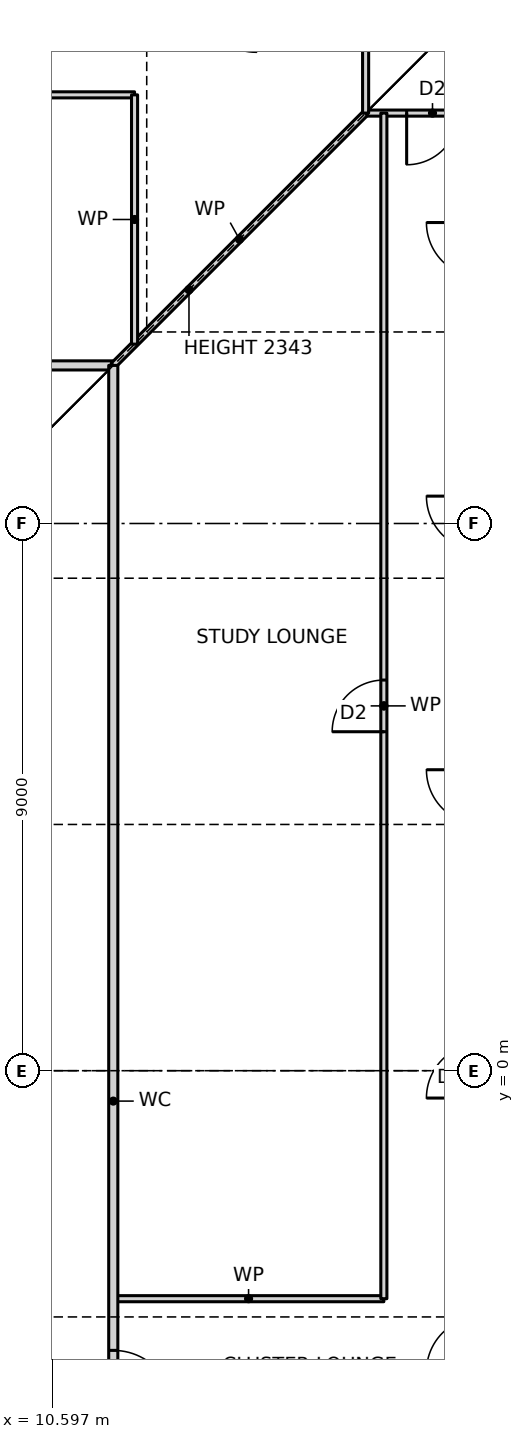
"""IFC4 building model, lengths in metres.
Left out: names, types, materials, properties, quantities, classifications, styles, units other than length and angle.
Written with IfcOpenShell. Run it as: python <this file> out.ifc"""

import sys

from ifc_helpers import new_model, si_unit, direction, frame, frame_2d, origin, place, context, subcontext, project, spatial, rectangle, extrude, element, fill, save


model = new_model("IFC4")
c1 = context("Model", 3, precision=1e-05, world=origin(), true_north=direction((0.0, 1.0)))
c2 = subcontext(c1, "Body", "Model", "MODEL_VIEW")
j1 = project(units=[si_unit("LENGTHUNIT", "METRE"), si_unit("PLANEANGLEUNIT", "RADIAN")], contexts=[c1])
p1 = place(None, origin())
s1 = spatial("IfcSite", under=j1, at=p1, CompositionType="ELEMENT")
p2 = place(p1, origin())
s2 = spatial("IfcBuilding", under=s1, at=p2, CompositionType="ELEMENT")
p3 = place(p2, frame((0.0, 0.0, 22.0)))
s3 = spatial("IfcBuildingStorey", under=s2, at=p3, CompositionType="ELEMENT", Elevation=22.0)
p4 = place(p3, frame((11.6, -3.75, 0.0), z_axis=(0.0, 0.0, 1.0), x_axis=(1.0, 0.0, 0.0)))
e1 = element("IfcWall", 1, at=p4, inside=s3, PredefinedType="PARTITIONING", context=c2, shape_type="SweptSolid", body=[
    extrude(rectangle(XDim=4.45, YDim=0.1, at=frame_2d((2.225, 0.0))), origin(), (0.0, 0.0, 1.0), 3.27),
])
p5 = place(p3, frame((-11.6, 11.6, 0.0), z_axis=(0.0, 0.0, 1.0), x_axis=(1.0, 0.0, 0.0)))
e2 = element("IfcWall", 2, at=p5, inside=s3, PredefinedType="PARTITIONING", context=c2, shape_type="SweptSolid", body=[
    extrude(rectangle(XDim=23.2, YDim=0.15, at=frame_2d((11.6, 0.0))), origin(), (0.0, 0.0, 1.0), 3.27),
])
p6 = place(p5, frame((1.65, 0.0, 0.0)))
e3 = element("IfcOpeningElement", 3, at=p6, cuts=e2, PredefinedType="OPENING", context=c2, shape_type="SweptSolid", body=[
    extrude(rectangle(XDim=1.0, YDim=2.1, at=frame_2d((0.5, 1.05))), frame((0.0, 0.085, 0.0), z_axis=(0.0, -1.0, 0.0), x_axis=(1.0, 0.0, 0.0)), (0.0, 0.0, 1.0), 0.17),
])
p7 = place(p3, frame((15.75, 15.75, 0.0), z_axis=(0.0, 0.0, 1.0), x_axis=(1.0, 0.0, 0.0)))
e4 = element("IfcWall", 4, at=p7, inside=s3, PredefinedType="PARTITIONING", context=c2, shape_type="SweptSolid", body=[
    extrude(rectangle(XDim=7.44, YDim=0.1, at=frame_2d((3.72, 0.0))), origin(), (0.0, 0.0, 1.0), 3.27),
])
p8 = place(p7, frame((0.675, 0.0, 0.0)))
e5 = element("IfcOpeningElement", 5, at=p8, cuts=e4, PredefinedType="OPENING", context=c2, shape_type="SweptSolid", body=[
    extrude(rectangle(XDim=0.85, YDim=2.1, at=frame_2d((0.425, 1.05))), frame((0.0, 0.06, 0.0), z_axis=(0.0, -1.0, 0.0), x_axis=(1.0, 0.0, 0.0)), (0.0, 0.0, 1.0), 0.12),
])
p9 = place(p3, frame((-8.25, 16.05, 0.0), z_axis=(0.0, 0.0, 1.0), x_axis=(1.0, 0.0, 0.0)))
e6 = element("IfcWall", 6, at=p9, inside=s3, PredefinedType="PARTITIONING", context=c2, shape_type="SweptSolid", body=[
    extrude(rectangle(XDim=20.2, YDim=0.1, at=frame_2d((10.1, 0.0))), origin(), (0.0, 0.0, 1.0), 3.27),
])
p10 = place(p9, frame((9.675, 0.0, 0.0)))
e7 = element("IfcOpeningElement", 7, at=p10, cuts=e6, PredefinedType="OPENING", context=c2, shape_type="SweptSolid", body=[
    extrude(rectangle(XDim=0.85, YDim=2.1, at=frame_2d((0.425, 1.05))), frame((0.0, 0.06, 0.0), z_axis=(0.0, -1.0, 0.0), x_axis=(1.0, 0.0, 0.0)), (0.0, 0.0, 1.0), 0.12),
])
p11 = place(p3, frame((11.6, 11.6, 0.0), z_axis=(0.0, 0.0, 1.0), x_axis=(0.707106781187, 0.707106781187, 0.0)))
e8 = element("IfcWall", 8, at=p11, inside=s3, PredefinedType="PARTITIONING", context=c2, shape_type="SweptSolid", body=[
    extrude(rectangle(XDim=5.869, YDim=0.1, at=frame_2d((2.935, 0.0))), origin(), (0.0, 0.0, 1.0), 2.343),
])
p12 = place(p3, frame((16.05, -3.75, 0.0), z_axis=(0.0, 0.0, 1.0), x_axis=(0.0, 1.0, 0.0)))
e9 = element("IfcWall", 9, at=p12, inside=s3, PredefinedType="PARTITIONING", context=c2, shape_type="SweptSolid", body=[
    extrude(rectangle(XDim=19.5, YDim=0.1, at=frame_2d((9.75, 0.0))), origin(), (0.0, 0.0, 1.0), 3.27),
])
p13 = place(p12, frame((9.325, 0.0, 0.0)))
e10 = element("IfcOpeningElement", 10, at=p13, cuts=e9, PredefinedType="OPENING", context=c2, shape_type="SweptSolid", body=[
    extrude(rectangle(XDim=0.85, YDim=2.1, at=frame_2d((0.425, 1.05))), frame((0.0, 0.06, 0.0), z_axis=(0.0, -1.0, 0.0), x_axis=(1.0, 0.0, 0.0)), (0.0, 0.0, 1.0), 0.12),
])
p14 = place(p3, frame((15.75, 15.75, 0.0), z_axis=(0.0, 0.0, 1.0), x_axis=(0.0, 1.0, 0.0)))
e11 = element("IfcWall", 11, at=p14, inside=s3, PredefinedType="PARTITIONING", context=c2, shape_type="SweptSolid", body=[
    extrude(rectangle(XDim=7.44, YDim=0.1, at=frame_2d((3.72, 0.0))), origin(), (0.0, 0.0, 1.0), 3.27),
])
p15 = place(p3, frame((11.95, 11.95, 0.0), z_axis=(0.0, 0.0, 1.0), x_axis=(0.0, 1.0, 0.0)))
e12 = element("IfcWall", 12, at=p15, inside=s3, PredefinedType="PARTITIONING", context=c2, shape_type="SweptSolid", body=[
    extrude(rectangle(XDim=4.1, YDim=0.1, at=frame_2d((2.05, 0.0))), origin(), (0.0, 0.0, 1.0), 3.27),
])
p16 = place(p3, frame((11.6, -12.6, 0.0), z_axis=(0.0, 0.0, 1.0), x_axis=(0.0, 1.0, 0.0)))
e13 = element("IfcWall", 13, at=p16, inside=s3, PredefinedType="PARTITIONING", context=c2, shape_type="SweptSolid", body=[
    extrude(rectangle(XDim=24.2, YDim=0.15, at=frame_2d((12.1, 0.0))), origin(), (0.0, 0.0, 1.0), 3.27),
])
p17 = place(p16, frame((7.0, 0.0, 0.0)))
e14 = element("IfcOpeningElement", 14, at=p17, cuts=e13, PredefinedType="OPENING", context=c2, shape_type="SweptSolid", body=[
    extrude(rectangle(XDim=1.0, YDim=2.1, at=frame_2d((0.5, 1.05))), frame((0.0, 0.085, 0.0), z_axis=(0.0, -1.0, 0.0), x_axis=(1.0, 0.0, 0.0)), (0.0, 0.0, 1.0), 0.17),
])
p18 = place(p16, frame((4.8, 0.0, 0.0)))
e15 = element("IfcOpeningElement", 15, at=p18, cuts=e13, PredefinedType="OPENING", context=c2, shape_type="SweptSolid", body=[
    extrude(rectangle(XDim=0.9, YDim=2.1, at=frame_2d((0.45, 1.05))), frame((0.0, 0.085, 0.0), z_axis=(0.0, -1.0, 0.0), x_axis=(1.0, 0.0, 0.0)), (0.0, 0.0, 1.0), 0.17),
])
p19 = place(p17, frame((1.0, 0.0, 0.0), z_axis=(0.0, 0.0, 1.0), x_axis=(-1.0, 0.0, 0.0)))
e16 = element("IfcDoor", 16, at=p19, inside=s3, OperationType="SINGLE_SWING_RIGHT", PredefinedType="DOOR", context=c2, shape_type="SweptSolid", body=[
    extrude(rectangle(XDim=1.0, YDim=2.1, at=frame_2d((0.5, 1.05))), frame((0.0, 0.025, 0.0), z_axis=(0.0, -1.0, 0.0), x_axis=(1.0, 0.0, 0.0)), (0.0, 0.0, 1.0), 0.05),
])
fill(e14, e16)
p20 = place(p13, origin())
e17 = element("IfcDoor", 17, at=p20, inside=s3, OperationType="SINGLE_SWING_LEFT", PredefinedType="DOOR", context=c2, shape_type="SweptSolid", body=[
    extrude(rectangle(XDim=0.85, YDim=2.1, at=frame_2d((0.425, 1.05))), frame((0.0, 0.025, 0.0), z_axis=(0.0, -1.0, 0.0), x_axis=(1.0, 0.0, 0.0)), (0.0, 0.0, 1.0), 0.05),
])
fill(e10, e17)
p21 = place(p8, frame((0.85, 0.0, 0.0), z_axis=(0.0, 0.0, 1.0), x_axis=(-1.0, 0.0, 0.0)))
e18 = element("IfcDoor", 18, at=p21, inside=s3, OperationType="SINGLE_SWING_RIGHT", PredefinedType="DOOR", context=c2, shape_type="SweptSolid", body=[
    extrude(rectangle(XDim=0.85, YDim=2.1, at=frame_2d((0.425, 1.05))), frame((0.0, 0.025, 0.0), z_axis=(0.0, -1.0, 0.0), x_axis=(1.0, 0.0, 0.0)), (0.0, 0.0, 1.0), 0.05),
])
fill(e5, e18)
save(model, sys.argv[1])
